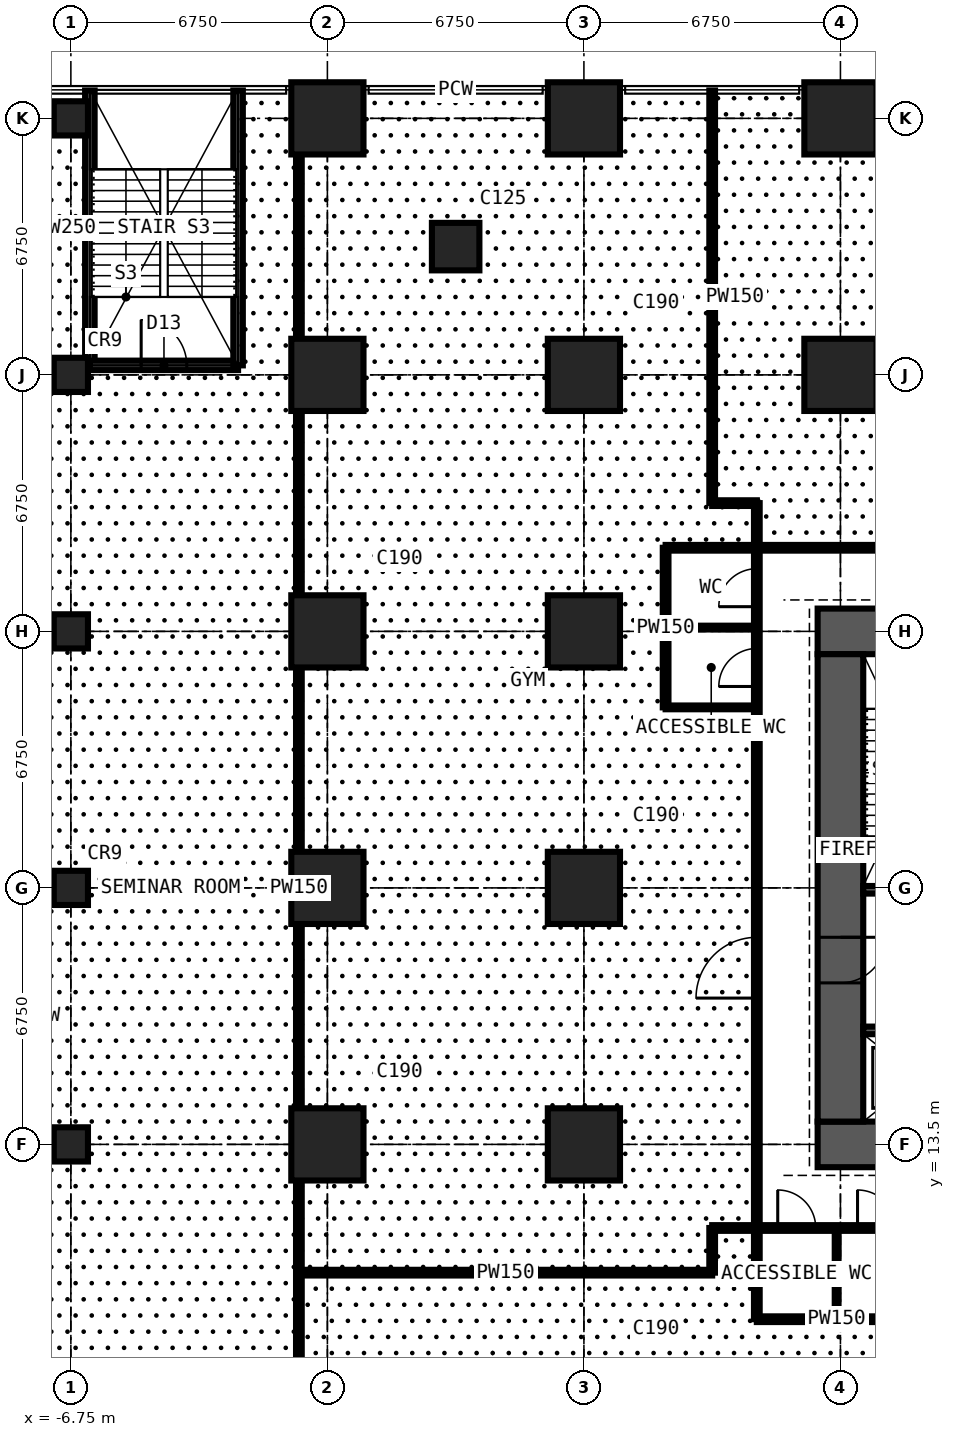
"""IFC4 building model, lengths in metres.
Left out: names, types, materials, properties, quantities, classifications, styles, units other than length and angle.
Written with IfcOpenShell. Run it as: python <this file> out.ifc"""

import sys

from ifc_helpers import new_model, si_unit, direction, frame, frame_2d, origin, origin_2d, place, context, subcontext, project, spatial, rectangle, circle, extrude, element, fill, save


model = new_model("IFC4")
c1 = context("Model", 3, precision=1e-05, world=origin(), true_north=direction((0.0, 1.0)))
c2 = subcontext(c1, "Body", "Model", "MODEL_VIEW")
j1 = project(units=[si_unit("LENGTHUNIT", "METRE"), si_unit("PLANEANGLEUNIT", "RADIAN")], contexts=[c1])
p1 = place(None, origin())
s1 = spatial("IfcSite", under=j1, at=p1, CompositionType="ELEMENT")
p2 = place(p1, origin())
s2 = spatial("IfcBuilding", under=s1, at=p2, CompositionType="ELEMENT")
p3 = place(p2, frame((0.0, 0.0, 9.0)))
s3 = spatial("IfcBuildingStorey", under=s2, at=p3, CompositionType="ELEMENT", Elevation=9.0)
for number, where, z_axis, x_axis in (
    (1, (-6.75, 13.5, 0.0), (0.0, 0.0, 1.0), (1.0, 0.0, 0.0)),
    (2, (-6.75, 20.25, 0.0), (0.0, 0.0, 1.0), (1.0, 0.0, 0.0)),
    (3, (-6.75, 27.0, 0.0), (0.0, 0.0, 1.0), (1.0, 0.0, 0.0)),
    (4, (-6.75, 33.75, 0.0), (0.0, 0.0, 1.0), (1.0, 0.0, 0.0)),
    (5, (-6.75, 40.5, 0.0), (0.0, 0.0, 1.0), (1.0, 0.0, 0.0)),
):
    element("IfcColumn", number, at=place(p3, frame(where, z_axis=z_axis, x_axis=x_axis)), inside=s3, PredefinedType="COLUMN", context=c2, shape_type="SweptSolid", body=[
        extrude(circle(Radius=0.45, at=origin_2d()), origin(), (0.0, 0.0, 1.0), 4.5),
    ])
for number, where, z_axis, x_axis in (
    (6, (0.0, 13.5, 0.0), (0.0, 0.0, 1.0), (1.0, 0.0, 0.0)),
    (7, (0.0, 20.25, 0.0), (0.0, 0.0, 1.0), (1.0, 0.0, 0.0)),
    (8, (0.0, 27.0, 0.0), (0.0, 0.0, 1.0), (1.0, 0.0, 0.0)),
    (9, (0.0, 33.75, 0.0), (0.0, 0.0, 1.0), (1.0, 0.0, 0.0)),
    (10, (0.0, 40.5, 0.0), (0.0, 0.0, 1.0), (1.0, 0.0, 0.0)),
):
    element("IfcColumn", number, at=place(p3, frame(where, z_axis=z_axis, x_axis=x_axis)), inside=s3, PredefinedType="COLUMN", context=c2, shape_type="SweptSolid", body=[
        extrude(rectangle(XDim=1.9, YDim=1.9, at=origin_2d()), origin(), (0.0, 0.0, 1.0), 4.5),
    ])
p4 = place(p3, frame((3.375, 37.125, 0.0), z_axis=(0.0, 0.0, 1.0), x_axis=(1.0, 0.0, 0.0)))
e11 = element("IfcColumn", 11, at=p4, inside=s3, PredefinedType="COLUMN", context=c2, shape_type="SweptSolid", body=[
    extrude(rectangle(XDim=1.25, YDim=1.25, at=origin_2d()), origin(), (0.0, 0.0, 1.0), 4.5),
])
for number, where, z_axis, x_axis in (
    (12, (6.75, 13.5, 0.0), (0.0, 0.0, 1.0), (1.0, 0.0, 0.0)),
    (13, (6.75, 20.25, 0.0), (0.0, 0.0, 1.0), (1.0, 0.0, 0.0)),
    (14, (6.75, 27.0, 0.0), (0.0, 0.0, 1.0), (1.0, 0.0, 0.0)),
    (15, (6.75, 33.75, 0.0), (0.0, 0.0, 1.0), (1.0, 0.0, 0.0)),
    (16, (6.75, 40.5, 0.0), (0.0, 0.0, 1.0), (1.0, 0.0, 0.0)),
    (17, (13.5, 33.75, 0.0), (0.0, 0.0, 1.0), (1.0, 0.0, 0.0)),
    (18, (13.5, 40.5, 0.0), (0.0, 0.0, 1.0), (1.0, 0.0, 0.0)),
):
    element("IfcColumn", number, at=place(p3, frame(where, z_axis=z_axis, x_axis=x_axis)), inside=s3, PredefinedType="COLUMN", context=c2, shape_type="SweptSolid", body=[
        extrude(rectangle(XDim=1.9, YDim=1.9, at=origin_2d()), origin(), (0.0, 0.0, 1.0), 4.5),
    ])
p5 = place(p3, frame((12.9, 13.5, 0.0), z_axis=(0.0, 0.0, 1.0), x_axis=(1.0, 0.0, 0.0)))
e19 = element("IfcWall", 19, at=p5, inside=s3, PredefinedType="SHEAR", context=c2, shape_type="SweptSolid", body=[
    extrude(rectangle(XDim=14.7, YDim=1.2, at=frame_2d((7.35, 0.0))), origin(), (0.0, 0.0, 1.0), 4.5),
])
p6 = place(p3, frame((27.6, 27.0, 0.0), z_axis=(0.0, 0.0, 1.0), x_axis=(-1.0, 0.0, 0.0)))
e20 = element("IfcWall", 20, at=p6, inside=s3, PredefinedType="SHEAR", context=c2, shape_type="SweptSolid", body=[
    extrude(rectangle(XDim=14.7, YDim=1.2, at=frame_2d((7.35, 0.0))), origin(), (0.0, 0.0, 1.0), 4.5),
])
p7 = place(p6, frame((5.225, 0.0, 0.0)))
e21 = element("IfcOpeningElement", 21, at=p7, cuts=e20, PredefinedType="OPENING", context=c2, shape_type="SweptSolid", body=[
    extrude(rectangle(XDim=0.9, YDim=2.2, at=frame_2d((0.45, 1.1))), frame((0.0, 0.61, 0.0), z_axis=(0.0, -1.0, 0.0), x_axis=(1.0, 0.0, 0.0)), (0.0, 0.0, 1.0), 1.22),
])
p8 = place(p6, frame((8.2, 0.0, 0.0)))
e22 = element("IfcOpeningElement", 22, at=p8, cuts=e20, PredefinedType="OPENING", context=c2, shape_type="SweptSolid", body=[
    extrude(rectangle(XDim=1.0, YDim=2.2, at=frame_2d((0.5, 1.1))), frame((0.0, 0.61, 0.0), z_axis=(0.0, -1.0, 0.0), x_axis=(1.0, 0.0, 0.0)), (0.0, 0.0, 1.0), 1.22),
])
p9 = place(p3, frame((13.5, 26.4, 0.0), z_axis=(0.0, 0.0, 1.0), x_axis=(0.0, -1.0, 0.0)))
e23 = element("IfcWall", 23, at=p9, inside=s3, PredefinedType="SHEAR", context=c2, shape_type="SweptSolid", body=[
    extrude(rectangle(XDim=12.3, YDim=1.2, at=frame_2d((6.15, 0.0))), origin(), (0.0, 0.0, 1.0), 4.5),
])
p10 = place(p9, frame((7.45, 0.0, 0.0)))
e24 = element("IfcOpeningElement", 24, at=p10, cuts=e23, PredefinedType="OPENING", context=c2, shape_type="SweptSolid", body=[
    extrude(rectangle(XDim=1.2, YDim=2.2, at=frame_2d((0.6, 1.1))), frame((0.0, 0.61, 0.0), z_axis=(0.0, -1.0, 0.0), x_axis=(1.0, 0.0, 0.0)), (0.0, 0.0, 1.0), 1.22),
])
p11 = place(p3, frame((14.1, 16.5, 0.0), z_axis=(0.0, 0.0, 1.0), x_axis=(1.0, 0.0, 0.0)))
e25 = element("IfcWall", 25, at=p11, inside=s3, PredefinedType="SHEAR", context=c2, shape_type="SweptSolid", body=[
    extrude(rectangle(XDim=12.3, YDim=0.2, at=frame_2d((6.15, 0.0))), origin(), (0.0, 0.0, 1.0), 4.5),
])
p12 = place(p11, frame((0.9, 0.0, 0.0)))
e26 = element("IfcOpeningElement", 26, at=p12, cuts=e25, PredefinedType="OPENING", context=c2, shape_type="SweptSolid", body=[
    extrude(rectangle(XDim=1.1, YDim=2.2, at=frame_2d((0.55, 1.1))), frame((0.0, 0.11, 0.0), z_axis=(0.0, -1.0, 0.0), x_axis=(1.0, 0.0, 0.0)), (0.0, 0.0, 1.0), 0.22),
])
p13 = place(p11, frame((9.5, 0.0, 0.0)))
e27 = element("IfcOpeningElement", 27, at=p13, cuts=e25, PredefinedType="OPENING", context=c2, shape_type="SweptSolid", body=[
    extrude(rectangle(XDim=1.1, YDim=2.2, at=frame_2d((0.55, 1.1))), frame((0.0, 0.11, 0.0), z_axis=(0.0, -1.0, 0.0), x_axis=(1.0, 0.0, 0.0)), (0.0, 0.0, 1.0), 0.22),
])
p14 = place(p3, frame((14.1, 20.2, 0.0), z_axis=(0.0, 0.0, 1.0), x_axis=(1.0, 0.0, 0.0)))
e28 = element("IfcWall", 28, at=p14, inside=s3, PredefinedType="SHEAR", context=c2, shape_type="SweptSolid", body=[
    extrude(rectangle(XDim=12.3, YDim=0.2, at=frame_2d((6.15, 0.0))), origin(), (0.0, 0.0, 1.0), 4.5),
])
p15 = place(p14, frame((0.35, 0.0, 0.0)))
e29 = element("IfcOpeningElement", 29, at=p15, cuts=e28, PredefinedType="OPENING", context=c2, shape_type="SweptSolid", body=[
    extrude(rectangle(XDim=1.1, YDim=2.2, at=frame_2d((0.55, 1.1))), frame((0.0, 0.11, 0.0), z_axis=(0.0, -1.0, 0.0), x_axis=(1.0, 0.0, 0.0)), (0.0, 0.0, 1.0), 0.22),
])
p16 = place(p14, frame((9.75, 0.0, 0.0)))
e30 = element("IfcOpeningElement", 30, at=p16, cuts=e28, PredefinedType="OPENING", context=c2, shape_type="SweptSolid", body=[
    extrude(rectangle(XDim=1.1, YDim=2.2, at=frame_2d((0.55, 1.1))), frame((0.0, 0.11, 0.0), z_axis=(0.0, -1.0, 0.0), x_axis=(1.0, 0.0, 0.0)), (0.0, 0.0, 1.0), 0.22),
])
p17 = place(p3, frame((-6.25, 34.0, 0.0), z_axis=(0.0, 0.0, 1.0), x_axis=(0.0, 1.0, 0.0)))
e31 = element("IfcWall", 31, at=p17, inside=s3, PredefinedType="SOLIDWALL", context=c2, shape_type="SweptSolid", body=[
    extrude(rectangle(XDim=7.234, YDim=0.25, at=frame_2d((3.617, 0.0))), origin(), (0.0, 0.0, 1.0), 4.25),
])
p18 = place(p3, frame((-6.25, 34.0, 0.0), z_axis=(0.0, 0.0, 1.0), x_axis=(1.0, 0.0, 0.0)))
e32 = element("IfcWall", 32, at=p18, inside=s3, PredefinedType="SOLIDWALL", context=c2, shape_type="SweptSolid", body=[
    extrude(rectangle(XDim=3.9, YDim=0.25, at=frame_2d((1.95, 0.0))), origin(), (0.0, 0.0, 1.0), 4.25),
])
p19 = place(p18, frame((1.35, 0.0, 0.0)))
e33 = element("IfcOpeningElement", 33, at=p19, cuts=e32, PredefinedType="OPENING", context=c2, shape_type="SweptSolid", body=[
    extrude(rectangle(XDim=1.2, YDim=2.2, at=frame_2d((0.6, 1.1))), frame((0.0, 0.135, 0.0), z_axis=(0.0, -1.0, 0.0), x_axis=(1.0, 0.0, 0.0)), (0.0, 0.0, 1.0), 0.27),
])
p20 = place(p3, frame((-2.35, 34.0, 0.0), z_axis=(0.0, 0.0, 1.0), x_axis=(0.0, 1.0, 0.0)))
e34 = element("IfcWall", 34, at=p20, inside=s3, PredefinedType="SOLIDWALL", context=c2, shape_type="SweptSolid", body=[
    extrude(rectangle(XDim=7.234, YDim=0.25, at=frame_2d((3.617, 0.0))), origin(), (0.0, 0.0, 1.0), 4.25),
])
p21 = place(p3, frame((-0.75, -0.75, 0.0), z_axis=(0.0, 0.0, 1.0), x_axis=(0.0, 1.0, 0.0)))
e35 = element("IfcWall", 35, at=p21, inside=s3, PredefinedType="PARTITIONING", context=c2, shape_type="SweptSolid", body=[
    extrude(rectangle(XDim=41.984, YDim=0.15, at=frame_2d((20.992, 0.0))), origin(), (0.0, 0.0, 1.0), 4.25),
])
p22 = place(p21, frame((4.65, 0.0, 0.0)))
e36 = element("IfcOpeningElement", 36, at=p22, cuts=e35, PredefinedType="OPENING", context=c2, shape_type="SweptSolid", body=[
    extrude(rectangle(XDim=1.6, YDim=2.4, at=frame_2d((0.8, 1.2))), frame((0.0, 0.085, 0.0), z_axis=(0.0, -1.0, 0.0), x_axis=(1.0, 0.0, 0.0)), (0.0, 0.0, 1.0), 0.17),
])
p23 = place(p3, frame((-0.75, 10.125, 0.0), z_axis=(0.0, 0.0, 1.0), x_axis=(1.0, 0.0, 0.0)))
e37 = element("IfcWall", 37, at=p23, inside=s3, PredefinedType="PARTITIONING", context=c2, shape_type="SweptSolid", body=[
    extrude(rectangle(XDim=10.875, YDim=0.15, at=frame_2d((5.438, 0.0))), origin(), (0.0, 0.0, 1.0), 4.25),
])
p24 = place(p3, frame((8.9, 25.0, 0.0), z_axis=(0.0, 0.0, 1.0), x_axis=(0.0, 1.0, 0.0)))
e38 = element("IfcWall", 38, at=p24, inside=s3, PredefinedType="PARTITIONING", context=c2, shape_type="SweptSolid", body=[
    extrude(rectangle(XDim=4.2, YDim=0.15, at=frame_2d((2.1, 0.0))), origin(), (0.0, 0.0, 1.0), 4.25),
])
p25 = place(p3, frame((8.9, 25.0, 0.0), z_axis=(0.0, 0.0, 1.0), x_axis=(1.0, 0.0, 0.0)))
e39 = element("IfcWall", 39, at=p25, inside=s3, PredefinedType="PARTITIONING", context=c2, shape_type="SweptSolid", body=[
    extrude(rectangle(XDim=2.4, YDim=0.1, at=frame_2d((1.2, 0.0))), origin(), (0.0, 0.0, 1.0), 4.25),
])
p26 = place(p3, frame((8.9, 27.1, 0.0), z_axis=(0.0, 0.0, 1.0), x_axis=(1.0, 0.0, 0.0)))
e40 = element("IfcWall", 40, at=p26, inside=s3, PredefinedType="PARTITIONING", context=c2, shape_type="SweptSolid", body=[
    extrude(rectangle(XDim=2.4, YDim=0.1, at=frame_2d((1.2, 0.0))), origin(), (0.0, 0.0, 1.0), 3.752),
])
p27 = place(p3, frame((8.9, 29.2, 0.0), z_axis=(0.0, 0.0, 1.0), x_axis=(1.0, 0.0, 0.0)))
e41 = element("IfcWall", 41, at=p27, inside=s3, PredefinedType="PARTITIONING", context=c2, shape_type="SweptSolid", body=[
    extrude(rectangle(XDim=21.475, YDim=0.15, at=frame_2d((10.738, 0.0))), origin(), (0.0, 0.0, 1.0), 4.25),
])
p28 = place(p27, frame((16.65, 0.0, 0.0)))
e42 = element("IfcOpeningElement", 42, at=p28, cuts=e41, PredefinedType="OPENING", context=c2, shape_type="SweptSolid", body=[
    extrude(rectangle(XDim=1.0, YDim=2.2, at=frame_2d((0.5, 1.1))), frame((0.0, 0.085, 0.0), z_axis=(0.0, -1.0, 0.0), x_axis=(1.0, 0.0, 0.0)), (0.0, 0.0, 1.0), 0.17),
])
p29 = place(p27, frame((18.75, 0.0, 0.0)))
e43 = element("IfcOpeningElement", 43, at=p29, cuts=e41, PredefinedType="OPENING", context=c2, shape_type="SweptSolid", body=[
    extrude(rectangle(XDim=1.0, YDim=2.2, at=frame_2d((0.5, 1.1))), frame((0.0, 0.085, 0.0), z_axis=(0.0, -1.0, 0.0), x_axis=(1.0, 0.0, 0.0)), (0.0, 0.0, 1.0), 0.17),
])
p30 = place(p27, frame((8.45, 0.0, 0.0)))
e44 = element("IfcOpeningElement", 44, at=p30, cuts=e41, PredefinedType="OPENING", context=c2, shape_type="SweptSolid", body=[
    extrude(rectangle(XDim=1.6, YDim=2.4, at=frame_2d((0.8, 1.2))), frame((0.0, 0.085, 0.0), z_axis=(0.0, -1.0, 0.0), x_axis=(1.0, 0.0, 0.0)), (0.0, 0.0, 1.0), 0.17),
])
p31 = place(p3, frame((10.125, 10.125, 0.0), z_axis=(0.0, 0.0, 1.0), x_axis=(0.0, 1.0, 0.0)))
e45 = element("IfcWall", 45, at=p31, inside=s3, PredefinedType="PARTITIONING", context=c2, shape_type="SweptSolid", body=[
    extrude(rectangle(XDim=1.175, YDim=0.15, at=frame_2d((0.587, 0.0))), origin(), (0.0, 0.0, 1.0), 4.25),
])
p32 = place(p3, frame((10.125, 11.3, 0.0), z_axis=(0.0, 0.0, 1.0), x_axis=(1.0, 0.0, 0.0)))
e46 = element("IfcWall", 46, at=p32, inside=s3, PredefinedType="PARTITIONING", context=c2, shape_type="SweptSolid", body=[
    extrude(rectangle(XDim=20.675, YDim=0.15, at=frame_2d((10.337, 0.0))), origin(), (0.0, 0.0, 1.0), 4.25),
])
p33 = place(p32, frame((1.725, 0.0, 0.0)))
e47 = element("IfcOpeningElement", 47, at=p33, cuts=e46, PredefinedType="OPENING", context=c2, shape_type="SweptSolid", body=[
    extrude(rectangle(XDim=1.0, YDim=2.2, at=frame_2d((0.5, 1.1))), frame((0.0, 0.085, 0.0), z_axis=(0.0, -1.0, 0.0), x_axis=(1.0, 0.0, 0.0)), (0.0, 0.0, 1.0), 0.17),
])
p34 = place(p32, frame((3.825, 0.0, 0.0)))
e48 = element("IfcOpeningElement", 48, at=p34, cuts=e46, PredefinedType="OPENING", context=c2, shape_type="SweptSolid", body=[
    extrude(rectangle(XDim=1.0, YDim=2.2, at=frame_2d((0.5, 1.1))), frame((0.0, 0.085, 0.0), z_axis=(0.0, -1.0, 0.0), x_axis=(1.0, 0.0, 0.0)), (0.0, 0.0, 1.0), 0.17),
])
p35 = place(p32, frame((10.675, 0.0, 0.0)))
e49 = element("IfcOpeningElement", 49, at=p35, cuts=e46, PredefinedType="OPENING", context=c2, shape_type="SweptSolid", body=[
    extrude(rectangle(XDim=1.5, YDim=2.2, at=frame_2d((0.75, 1.1))), frame((0.0, 0.085, 0.0), z_axis=(0.0, -1.0, 0.0), x_axis=(1.0, 0.0, 0.0)), (0.0, 0.0, 1.0), 0.17),
])
p36 = place(p3, frame((10.125, 30.375, 0.0), z_axis=(0.0, 0.0, 1.0), x_axis=(0.0, 1.0, 0.0)))
e50 = element("IfcWall", 50, at=p36, inside=s3, PredefinedType="PARTITIONING", context=c2, shape_type="SweptSolid", body=[
    extrude(rectangle(XDim=10.859, YDim=0.15, at=frame_2d((5.429, 0.0))), origin(), (0.0, 0.0, 1.0), 4.25),
])
p37 = place(p3, frame((10.125, 30.375, 0.0), z_axis=(0.0, 0.0, 1.0), x_axis=(1.0, 0.0, 0.0)))
e51 = element("IfcWall", 51, at=p37, inside=s3, PredefinedType="PARTITIONING", context=c2, shape_type="SweptSolid", body=[
    extrude(rectangle(XDim=1.175, YDim=0.15, at=frame_2d((0.587, 0.0))), origin(), (0.0, 0.0, 1.0), 4.25),
])
p38 = place(p3, frame((11.3, 8.9, 0.0), z_axis=(0.0, 0.0, 1.0), x_axis=(0.0, 1.0, 0.0)))
e52 = element("IfcWall", 52, at=p38, inside=s3, PredefinedType="PARTITIONING", context=c2, shape_type="SweptSolid", body=[
    extrude(rectangle(XDim=21.475, YDim=0.15, at=frame_2d((10.738, 0.0))), origin(), (0.0, 0.0, 1.0), 4.25),
])
p39 = place(p38, frame((16.65, 0.0, 0.0)))
e53 = element("IfcOpeningElement", 53, at=p39, cuts=e52, PredefinedType="OPENING", context=c2, shape_type="SweptSolid", body=[
    extrude(rectangle(XDim=1.0, YDim=2.2, at=frame_2d((0.5, 1.1))), frame((0.0, 0.085, 0.0), z_axis=(0.0, -1.0, 0.0), x_axis=(1.0, 0.0, 0.0)), (0.0, 0.0, 1.0), 0.17),
])
p40 = place(p38, frame((18.75, 0.0, 0.0)))
e54 = element("IfcOpeningElement", 54, at=p40, cuts=e52, PredefinedType="OPENING", context=c2, shape_type="SweptSolid", body=[
    extrude(rectangle(XDim=1.0, YDim=2.2, at=frame_2d((0.5, 1.1))), frame((0.0, 0.085, 0.0), z_axis=(0.0, -1.0, 0.0), x_axis=(1.0, 0.0, 0.0)), (0.0, 0.0, 1.0), 0.17),
])
p41 = place(p38, frame((8.45, 0.0, 0.0)))
e55 = element("IfcOpeningElement", 55, at=p41, cuts=e52, PredefinedType="OPENING", context=c2, shape_type="SweptSolid", body=[
    extrude(rectangle(XDim=1.6, YDim=2.4, at=frame_2d((0.8, 1.2))), frame((0.0, 0.085, 0.0), z_axis=(0.0, -1.0, 0.0), x_axis=(1.0, 0.0, 0.0)), (0.0, 0.0, 1.0), 0.17),
])
p42 = place(p3, frame((11.3, 8.9, 0.0), z_axis=(0.0, 0.0, 1.0), x_axis=(1.0, 0.0, 0.0)))
e56 = element("IfcWall", 56, at=p42, inside=s3, PredefinedType="PARTITIONING", context=c2, shape_type="SweptSolid", body=[
    extrude(rectangle(XDim=4.2, YDim=0.15, at=frame_2d((2.1, 0.0))), origin(), (0.0, 0.0, 1.0), 4.25),
])
p43 = place(p3, frame((13.4, 8.9, 0.0), z_axis=(0.0, 0.0, 1.0), x_axis=(0.0, 1.0, 0.0)))
e57 = element("IfcWall", 57, at=p43, inside=s3, PredefinedType="PARTITIONING", context=c2, shape_type="SweptSolid", body=[
    extrude(rectangle(XDim=2.4, YDim=0.1, at=frame_2d((1.2, 0.0))), origin(), (0.0, 0.0, 1.0), 3.752),
])
p44 = place(p10, origin())
e58 = element("IfcDoor", 58, at=p44, inside=s3, OperationType="DOUBLE_DOOR_SINGLE_SWING", PredefinedType="DOOR", context=c2, shape_type="SweptSolid", body=[
    extrude(rectangle(XDim=1.2, YDim=2.2, at=frame_2d((0.6, 1.1))), frame((0.0, 0.025, 0.0), z_axis=(0.0, -1.0, 0.0), x_axis=(1.0, 0.0, 0.0)), (0.0, 0.0, 1.0), 0.05),
])
fill(e24, e58)
p45 = place(p33, origin())
e59 = element("IfcDoor", 59, at=p45, inside=s3, OperationType="SINGLE_SWING_LEFT", PredefinedType="DOOR", context=c2, shape_type="SweptSolid", body=[
    extrude(rectangle(XDim=1.0, YDim=2.2, at=frame_2d((0.5, 1.1))), frame((0.0, 0.025, 0.0), z_axis=(0.0, -1.0, 0.0), x_axis=(1.0, 0.0, 0.0)), (0.0, 0.0, 1.0), 0.05),
])
fill(e47, e59)
p46 = place(p34, origin())
e60 = element("IfcDoor", 60, at=p46, inside=s3, OperationType="SINGLE_SWING_LEFT", PredefinedType="DOOR", context=c2, shape_type="SweptSolid", body=[
    extrude(rectangle(XDim=1.0, YDim=2.2, at=frame_2d((0.5, 1.1))), frame((0.0, 0.025, 0.0), z_axis=(0.0, -1.0, 0.0), x_axis=(1.0, 0.0, 0.0)), (0.0, 0.0, 1.0), 0.05),
])
fill(e48, e60)
p47 = place(p39, origin())
e61 = element("IfcDoor", 61, at=p47, inside=s3, OperationType="SINGLE_SWING_LEFT", PredefinedType="DOOR", context=c2, shape_type="SweptSolid", body=[
    extrude(rectangle(XDim=1.0, YDim=2.2, at=frame_2d((0.5, 1.1))), frame((0.0, 0.025, 0.0), z_axis=(0.0, -1.0, 0.0), x_axis=(1.0, 0.0, 0.0)), (0.0, 0.0, 1.0), 0.05),
])
fill(e53, e61)
p48 = place(p40, origin())
e62 = element("IfcDoor", 62, at=p48, inside=s3, OperationType="SINGLE_SWING_LEFT", PredefinedType="DOOR", context=c2, shape_type="SweptSolid", body=[
    extrude(rectangle(XDim=1.0, YDim=2.2, at=frame_2d((0.5, 1.1))), frame((0.0, 0.025, 0.0), z_axis=(0.0, -1.0, 0.0), x_axis=(1.0, 0.0, 0.0)), (0.0, 0.0, 1.0), 0.05),
])
fill(e54, e62)
p49 = place(p41, origin())
e63 = element("IfcDoor", 63, at=p49, inside=s3, OperationType="DOUBLE_DOOR_SINGLE_SWING", PredefinedType="DOOR", context=c2, shape_type="SweptSolid", body=[
    extrude(rectangle(XDim=1.6, YDim=2.4, at=frame_2d((0.8, 1.2))), frame((0.0, 0.025, 0.0), z_axis=(0.0, -1.0, 0.0), x_axis=(1.0, 0.0, 0.0)), (0.0, 0.0, 1.0), 0.05),
])
fill(e55, e63)
p50 = place(p19, origin())
e64 = element("IfcDoor", 64, at=p50, inside=s3, OperationType="SINGLE_SWING_LEFT", PredefinedType="DOOR", context=c2, shape_type="SweptSolid", body=[
    extrude(rectangle(XDim=1.2, YDim=2.2, at=frame_2d((0.6, 1.1))), frame((0.0, 0.025, 0.0), z_axis=(0.0, -1.0, 0.0), x_axis=(1.0, 0.0, 0.0)), (0.0, 0.0, 1.0), 0.05),
])
fill(e33, e64)
save(model, sys.argv[1])
